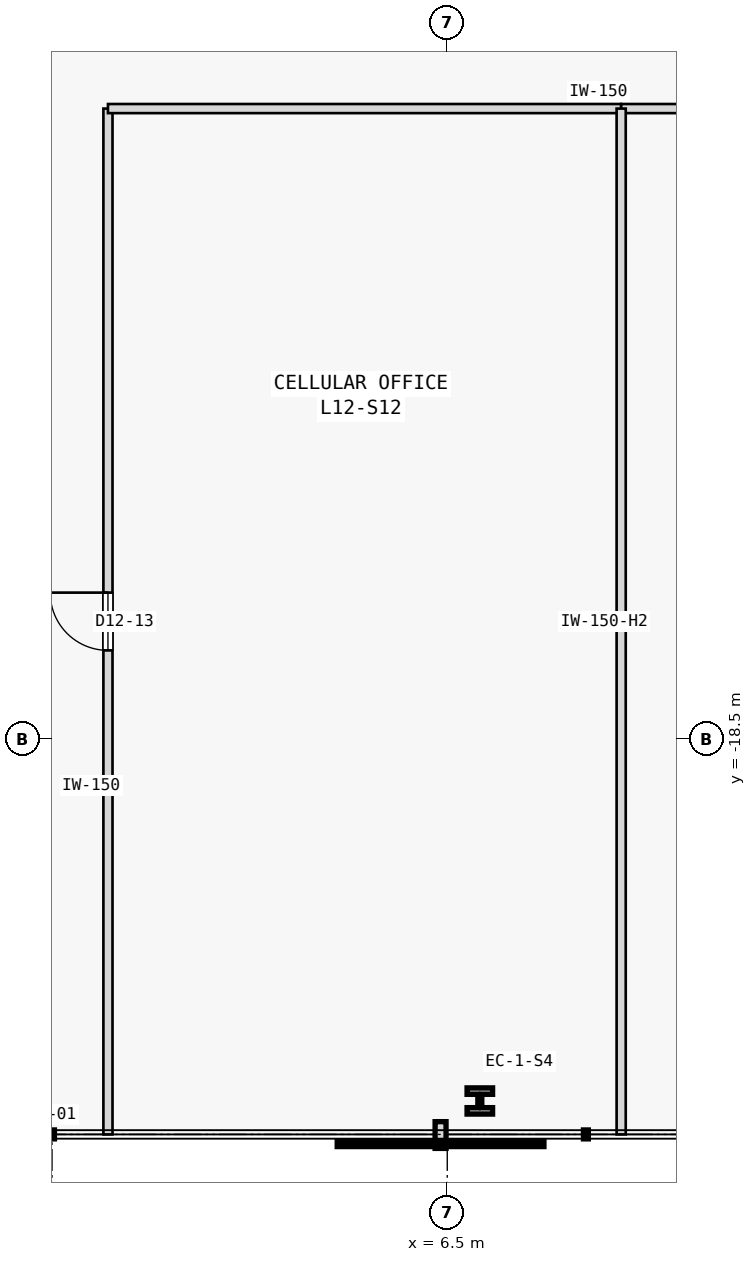
"""IFC4 building model, lengths in metres.
Left out: names, types, materials, properties, quantities, classifications, styles, units other than length and angle.
Written with IfcOpenShell. Run it as: python <this file> out.ifc"""

import sys

from ifc_helpers import new_model, si_unit, direction, frame, frame_2d, origin, origin_2d, place, context, subcontext, project, spatial, rectangle, i_section, extrude, element, fill, save


model = new_model("IFC4")
c1 = context("Model", 3, precision=1e-05, world=origin(), true_north=direction((0.0, 1.0)))
c2 = subcontext(c1, "Body", "Model", "MODEL_VIEW")
j1 = project(units=[si_unit("LENGTHUNIT", "METRE"), si_unit("PLANEANGLEUNIT", "RADIAN")], contexts=[c1])
p1 = place(None, origin())
s1 = spatial("IfcSite", under=j1, at=p1, CompositionType="ELEMENT")
p2 = place(p1, origin())
s2 = spatial("IfcBuilding", under=s1, at=p2, CompositionType="ELEMENT")
p3 = place(p2, frame((0.0, 0.0, 52.2)))
s3 = spatial("IfcBuildingStorey", under=s2, at=p3, CompositionType="ELEMENT", Elevation=52.2)
p4 = place(p3, frame((7.036, -24.45, 0.0), z_axis=(0.0, 0.0, 1.0), x_axis=(1.0, 0.0, 0.0)))
e1 = element("IfcColumn", 1, at=p4, inside=s3, PredefinedType="COLUMN", context=c2, shape_type="SweptSolid", body=[
    extrude(i_section(OverallWidth=0.42, OverallDepth=0.431, WebThickness=0.065, FlangeThickness=0.106, FilletRadius=0.015, at=origin_2d()), origin(), (0.0, 0.0, 1.0), 3.8),
])
p5 = place(p3, frame((0.92, -25.0, 0.0), z_axis=(0.0, 0.0, 1.0), x_axis=(0.0, 1.0, 0.0)))
e2 = element("IfcWall", 2, at=p5, inside=s3, PredefinedType="PARTITIONING", context=c2, shape_type="SweptSolid", body=[
    extrude(rectangle(XDim=16.87, YDim=0.15, at=frame_2d((8.435, 0.0))), origin(), (0.0, 0.0, 1.0), 3.575),
])
p6 = place(p5, frame((7.96, 0.0, 0.0)))
e3 = element("IfcOpeningElement", 3, at=p6, cuts=e2, PredefinedType="OPENING", context=c2, shape_type="SweptSolid", body=[
    extrude(rectangle(XDim=0.95, YDim=2.15, at=frame_2d((0.475, 1.075))), frame((0.0, 0.085, 0.0), z_axis=(0.0, -1.0, 0.0), x_axis=(1.0, 0.0, 0.0)), (0.0, 0.0, 1.0), 0.17),
])
p7 = place(p3, frame((0.92, -8.13, 0.0), z_axis=(0.0, 0.0, 1.0), x_axis=(1.0, 0.0, 0.0)))
e4 = element("IfcWall", 4, at=p7, inside=s3, PredefinedType="PARTITIONING", context=c2, shape_type="SweptSolid", body=[
    extrude(rectangle(XDim=8.44, YDim=0.15, at=frame_2d((4.22, 0.0))), origin(), (0.0, 0.0, 1.0), 3.575),
])
p8 = place(p3, frame((9.36, -8.13, 0.0), z_axis=(0.0, 0.0, 1.0), x_axis=(1.0, 0.0, 0.0)))
e5 = element("IfcWall", 5, at=p8, inside=s3, PredefinedType="PARTITIONING", context=c2, shape_type="SweptSolid", body=[
    extrude(rectangle(XDim=7.699, YDim=0.15, at=frame_2d((3.85, 0.0))), origin(), (0.0, 0.0, 1.0), 3.575),
])
p9 = place(p8, frame((3.375, 0.0, 0.0)))
e6 = element("IfcOpeningElement", 6, at=p9, cuts=e5, PredefinedType="OPENING", context=c2, shape_type="SweptSolid", body=[
    extrude(rectangle(XDim=0.95, YDim=2.15, at=frame_2d((0.475, 1.075))), frame((0.0, 0.085, 0.0), z_axis=(0.0, -1.0, 0.0), x_axis=(1.0, 0.0, 0.0)), (0.0, 0.0, 1.0), 0.17),
])
p10 = place(p3, frame((9.36, -25.0, 0.0), z_axis=(0.0, 0.0, 1.0), x_axis=(0.0, 1.0, 0.0)))
e7 = element("IfcWall", 7, at=p10, inside=s3, PredefinedType="PARTITIONING", context=c2, shape_type="SweptSolid", body=[
    extrude(rectangle(XDim=16.87, YDim=0.15, at=frame_2d((8.435, 0.0))), origin(), (0.0, 0.0, 1.0), 2.975),
])
p11 = place(p6, origin())
e8 = element("IfcDoor", 8, at=p11, inside=s3, OperationType="SINGLE_SWING_RIGHT", PredefinedType="DOOR", context=c2, shape_type="SweptSolid", body=[
    extrude(rectangle(XDim=0.95, YDim=2.15, at=frame_2d((0.475, 1.075))), frame((0.0, 0.025, 0.0), z_axis=(0.0, -1.0, 0.0), x_axis=(1.0, 0.0, 0.0)), (0.0, 0.0, 1.0), 0.05),
])
fill(e3, e8)
save(model, sys.argv[1])
